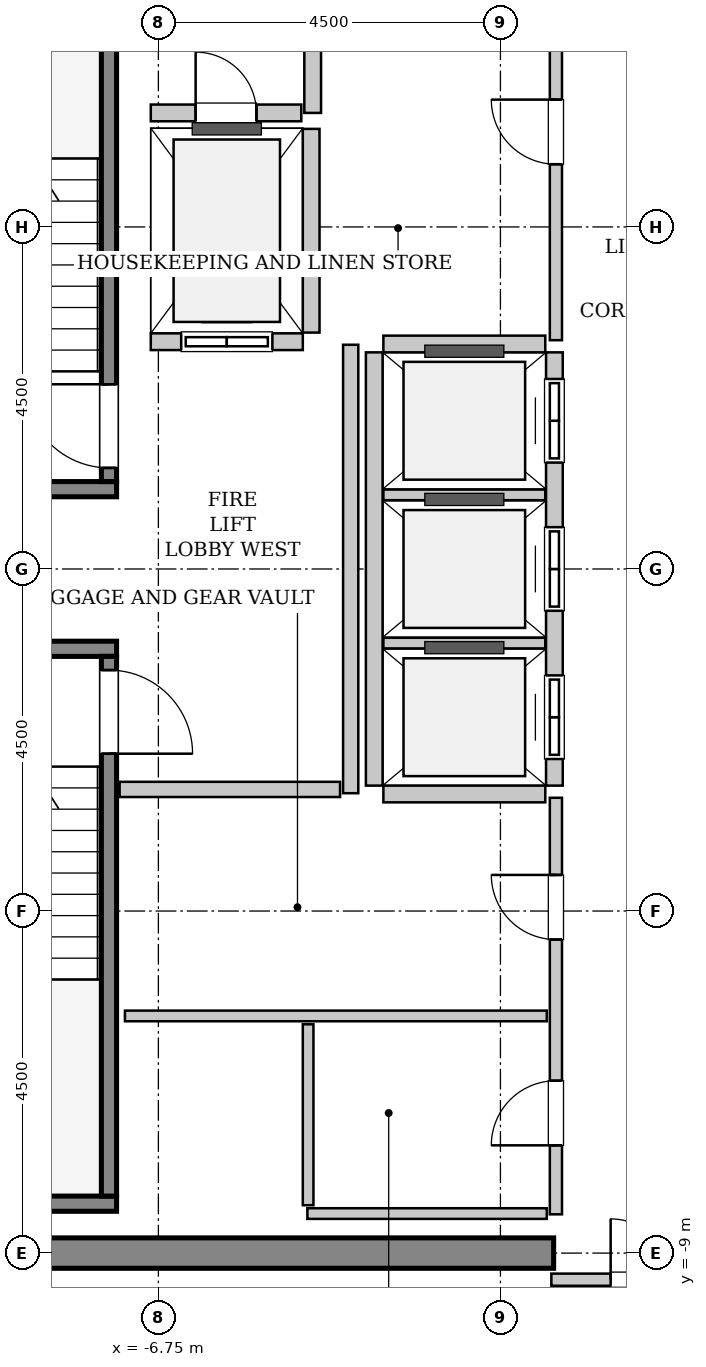
"""IFC4 building model, lengths in metres.
Left out: names, types, materials, properties, quantities, classifications, styles, units other than length and angle.
Written with IfcOpenShell. Run it as: python <this file> out.ifc"""

import sys

from ifc_helpers import new_model, si_unit, direction, frame, frame_2d, origin, place, context, subcontext, project, spatial, rectangle, extrude, source, transform, mapped, element, fill, save


model = new_model("IFC4")
c1 = context("Model", 3, precision=1e-05, world=origin(), true_north=direction((0.0, 1.0)))
c2 = subcontext(c1, "Body", "Model", "MODEL_VIEW")
j1 = project(units=[si_unit("LENGTHUNIT", "METRE"), si_unit("PLANEANGLEUNIT", "RADIAN")], contexts=[c1])
p1 = place(None, origin())
s1 = spatial("IfcSite", under=j1, at=p1, CompositionType="ELEMENT")
p2 = place(p1, origin())
s2 = spatial("IfcBuilding", under=s1, at=p2, CompositionType="ELEMENT")
p3 = place(p2, frame((0.0, 0.0, 326.2)))
s3 = spatial("IfcBuildingStorey", under=s2, at=p3, CompositionType="ELEMENT", Elevation=326.2)
m1 = source(origin(), c2, "Body", "SweptSolid", [
    extrude(rectangle(XDim=9.9, YDim=0.4, at=frame_2d((4.95, 0.0))), origin(), (0.0, 0.0, 1.0), 3.8),
])
p4 = place(p3, frame((-11.45, -9.0, 0.0), z_axis=(0.0, 0.0, 1.0), x_axis=(1.0, 0.0, 0.0)))
e1 = element("IfcWall", 1, at=p4, inside=s3, PredefinedType="SHEAR", context=c2, shape_type="MappedRepresentation", body=[
    mapped(m1, transform((0.0, 0.0, 0.0), x_axis=(1.0, 0.0, 0.0), y_axis=(0.0, 1.0, 0.0), z_axis=(0.0, 0.0, 1.0), scale=1.0)),
])
m2 = source(origin(), c2, "Body", "SweptSolid", [
    extrude(rectangle(XDim=3.4, YDim=0.2, at=frame_2d((1.7, 0.0))), origin(), (0.0, 0.0, 1.0), 3.8),
])
p5 = place(p3, frame((-7.3, 1.05, 0.0), z_axis=(0.0, 0.0, 1.0), x_axis=(-1.0, 0.0, 0.0)))
e2 = element("IfcWall", 2, at=p5, inside=s3, PredefinedType="SOLIDWALL", context=c2, shape_type="MappedRepresentation", body=[
    mapped(m2, transform((0.0, 0.0, 0.0), x_axis=(1.0, 0.0, 0.0), y_axis=(0.0, 1.0, 0.0), z_axis=(0.0, 0.0, 1.0), scale=1.0)),
])
m3 = source(origin(), c2, "Body", "SweptSolid", [
    extrude(rectangle(XDim=7.1, YDim=0.2, at=frame_2d((3.55, 0.0))), origin(), (0.0, 0.0, 1.0), 3.8),
])
p6 = place(p3, frame((-7.4, 1.15, 0.0), z_axis=(0.0, 0.0, 1.0), x_axis=(0.0, 1.0, 0.0)))
e3 = element("IfcWall", 3, at=p6, inside=s3, PredefinedType="SOLIDWALL", context=c2, shape_type="MappedRepresentation", body=[
    mapped(m3, transform((0.0, 0.0, 0.0), x_axis=(1.0, 0.0, 0.0), y_axis=(0.0, 1.0, 0.0), z_axis=(0.0, 0.0, 1.0), scale=1.0)),
])
p7 = place(p6, frame((0.18, 0.0, 0.0)))
e4 = element("IfcOpeningElement", 4, at=p7, cuts=e3, PredefinedType="OPENING", context=c2, shape_type="SweptSolid", body=[
    extrude(rectangle(XDim=1.1, YDim=2.15, at=frame_2d((0.55, 1.075))), frame((0.0, 0.11, 0.0), z_axis=(0.0, -1.0, 0.0), x_axis=(1.0, 0.0, 0.0)), (0.0, 0.0, 1.0), 0.22),
])
p8 = place(p3, frame((-10.7, -1.05, 0.0), z_axis=(0.0, 0.0, 1.0), x_axis=(1.0, 0.0, 0.0)))
e5 = element("IfcWall", 5, at=p8, inside=s3, PredefinedType="SOLIDWALL", context=c2, shape_type="MappedRepresentation", body=[
    mapped(m2, transform((0.0, 0.0, 0.0), x_axis=(1.0, 0.0, 0.0), y_axis=(0.0, 1.0, 0.0), z_axis=(0.0, 0.0, 1.0), scale=1.0)),
])
m4 = source(origin(), c2, "Body", "SweptSolid", [
    extrude(rectangle(XDim=3.755, YDim=0.2, at=frame_2d((1.877, 0.0))), origin(), (0.0, 0.0, 1.0), 3.8),
])
p9 = place(p3, frame((-11.055, -8.35, 0.0), z_axis=(0.0, 0.0, 1.0), x_axis=(1.0, 0.0, 0.0)))
e6 = element("IfcWall", 6, at=p9, inside=s3, PredefinedType="SOLIDWALL", context=c2, shape_type="MappedRepresentation", body=[
    mapped(m4, transform((0.0, 0.0, 0.0), x_axis=(1.0, 0.0, 0.0), y_axis=(0.0, 1.0, 0.0), z_axis=(0.0, 0.0, 1.0), scale=1.0)),
])
p10 = place(p3, frame((-7.4, -1.15, 0.0), z_axis=(0.0, 0.0, 1.0), x_axis=(0.0, -1.0, 0.0)))
e7 = element("IfcWall", 7, at=p10, inside=s3, PredefinedType="SOLIDWALL", context=c2, shape_type="MappedRepresentation", body=[
    mapped(m3, transform((0.0, 0.0, 0.0), x_axis=(1.0, 0.0, 0.0), y_axis=(0.0, 1.0, 0.0), z_axis=(0.0, 0.0, 1.0), scale=1.0)),
])
p11 = place(p10, frame((0.18, 0.0, 0.0)))
e8 = element("IfcOpeningElement", 8, at=p11, cuts=e7, PredefinedType="OPENING", context=c2, shape_type="SweptSolid", body=[
    extrude(rectangle(XDim=1.1, YDim=2.15, at=frame_2d((0.55, 1.075))), frame((0.0, 0.11, 0.0), z_axis=(0.0, -1.0, 0.0), x_axis=(1.0, 0.0, 0.0)), (0.0, 0.0, 1.0), 0.22),
])
m5 = source(origin(), c2, "Body", "SweptSolid", [
    extrude(rectangle(XDim=2.0, YDim=0.22, at=frame_2d((1.0, 0.0))), origin(), (0.0, 0.0, 1.0), 3.535),
])
p12 = place(p3, frame((-6.85, 2.99, 0.0), z_axis=(0.0, 0.0, 1.0), x_axis=(1.0, 0.0, 0.0)))
e9 = element("IfcWall", 9, at=p12, inside=s3, PredefinedType="SOLIDWALL", context=c2, shape_type="MappedRepresentation", body=[
    mapped(m5, transform((0.0, 0.0, 0.0), x_axis=(1.0, 0.0, 0.0), y_axis=(0.0, 1.0, 0.0), z_axis=(0.0, 0.0, 1.0), scale=1.0)),
])
p13 = place(p12, frame((0.4, 0.0, 0.0)))
e10 = element("IfcOpeningElement", 10, at=p13, cuts=e9, PredefinedType="OPENING", context=c2, shape_type="SweptSolid", body=[
    extrude(rectangle(XDim=1.2, YDim=2.2, at=frame_2d((0.6, 1.1))), frame((0.0, 0.12, 0.0), z_axis=(0.0, -1.0, 0.0), x_axis=(1.0, 0.0, 0.0)), (0.0, 0.0, 1.0), 0.24),
])
m6 = source(origin(), c2, "Body", "SweptSolid", [
    extrude(rectangle(XDim=2.68, YDim=0.22, at=frame_2d((1.34, 0.0))), origin(), (0.0, 0.0, 1.0), 3.535),
])
p14 = place(p3, frame((-4.74, 3.11, 0.0), z_axis=(0.0, 0.0, 1.0), x_axis=(0.0, 1.0, 0.0)))
e11 = element("IfcWall", 11, at=p14, inside=s3, PredefinedType="SOLIDWALL", context=c2, shape_type="MappedRepresentation", body=[
    mapped(m6, transform((0.0, 0.0, 0.0), x_axis=(1.0, 0.0, 0.0), y_axis=(0.0, 1.0, 0.0), z_axis=(0.0, 0.0, 1.0), scale=1.0)),
])
m7 = source(origin(), c2, "Body", "SweptSolid", [
    extrude(rectangle(XDim=5.7, YDim=0.22, at=frame_2d((2.85, 0.0))), origin(), (0.0, 0.0, 1.0), 3.535),
])
p15 = place(p3, frame((-1.54, -2.85, 0.0), z_axis=(0.0, 0.0, 1.0), x_axis=(0.0, 1.0, 0.0)))
e12 = element("IfcWall", 12, at=p15, inside=s3, PredefinedType="SOLIDWALL", context=c2, shape_type="MappedRepresentation", body=[
    mapped(m7, transform((0.0, 0.0, 0.0), x_axis=(1.0, 0.0, 0.0), y_axis=(0.0, 1.0, 0.0), z_axis=(0.0, 0.0, 1.0), scale=1.0)),
])
p16 = place(p15, frame((0.35, 0.0, 0.0)))
e13 = element("IfcOpeningElement", 13, at=p16, cuts=e12, PredefinedType="OPENING", context=c2, shape_type="SweptSolid", body=[
    extrude(rectangle(XDim=1.1, YDim=2.2, at=frame_2d((0.55, 1.1))), frame((0.0, 0.12, 0.0), z_axis=(0.0, -1.0, 0.0), x_axis=(1.0, 0.0, 0.0)), (0.0, 0.0, 1.0), 0.24),
])
p17 = place(p15, frame((2.3, 0.0, 0.0)))
e14 = element("IfcOpeningElement", 14, at=p17, cuts=e12, PredefinedType="OPENING", context=c2, shape_type="SweptSolid", body=[
    extrude(rectangle(XDim=1.1, YDim=2.2, at=frame_2d((0.55, 1.1))), frame((0.0, 0.12, 0.0), z_axis=(0.0, -1.0, 0.0), x_axis=(1.0, 0.0, 0.0)), (0.0, 0.0, 1.0), 0.24),
])
p18 = place(p15, frame((4.25, 0.0, 0.0)))
e15 = element("IfcOpeningElement", 15, at=p18, cuts=e12, PredefinedType="OPENING", context=c2, shape_type="SweptSolid", body=[
    extrude(rectangle(XDim=1.1, YDim=2.2, at=frame_2d((0.55, 1.1))), frame((0.0, 0.12, 0.0), z_axis=(0.0, -1.0, 0.0), x_axis=(1.0, 0.0, 0.0)), (0.0, 0.0, 1.0), 0.24),
])
p19 = place(p3, frame((-3.91, 2.85, 0.0), z_axis=(0.0, 0.0, 1.0), x_axis=(0.0, -1.0, 0.0)))
e16 = element("IfcWall", 16, at=p19, inside=s3, PredefinedType="SOLIDWALL", context=c2, shape_type="MappedRepresentation", body=[
    mapped(m7, transform((0.0, 0.0, 0.0), x_axis=(1.0, 0.0, 0.0), y_axis=(0.0, 1.0, 0.0), z_axis=(0.0, 0.0, 1.0), scale=1.0)),
])
m8 = source(origin(), c2, "Body", "SweptSolid", [
    extrude(rectangle(XDim=2.13, YDim=0.22, at=frame_2d((1.065, 0.0))), origin(), (0.0, 0.0, 1.0), 3.535),
])
p20 = place(p3, frame((-3.79, -2.96, 0.0), z_axis=(0.0, 0.0, 1.0), x_axis=(1.0, 0.0, 0.0)))
e17 = element("IfcWall", 17, at=p20, inside=s3, PredefinedType="SOLIDWALL", context=c2, shape_type="MappedRepresentation", body=[
    mapped(m8, transform((0.0, 0.0, 0.0), x_axis=(1.0, 0.0, 0.0), y_axis=(0.0, 1.0, 0.0), z_axis=(0.0, 0.0, 1.0), scale=1.0)),
])
m9 = source(origin(), c2, "Body", "SweptSolid", [
    extrude(rectangle(XDim=2.13, YDim=0.14, at=frame_2d((1.065, 0.0))), origin(), (0.0, 0.0, 1.0), 3.535),
])
for number, where, z_axis, x_axis in (
    (18, (-3.79, -0.975, 0.0), (0.0, 0.0, 1.0), (1.0, 0.0, 0.0)),
    (19, (-3.79, 0.975, 0.0), (0.0, 0.0, 1.0), (1.0, 0.0, 0.0)),
):
    element("IfcWall", number, at=place(p3, frame(where, z_axis=z_axis, x_axis=x_axis)), inside=s3, PredefinedType="PARTITIONING", context=c2, shape_type="MappedRepresentation", body=[
        mapped(m9, transform((0.0, 0.0, 0.0), x_axis=(1.0, 0.0, 0.0), y_axis=(0.0, 1.0, 0.0), z_axis=(0.0, 0.0, 1.0), scale=1.0)),
    ])
p21 = place(p3, frame((-1.66, 2.96, 0.0), z_axis=(0.0, 0.0, 1.0), x_axis=(-1.0, 0.0, 0.0)))
e20 = element("IfcWall", 20, at=p21, inside=s3, PredefinedType="SOLIDWALL", context=c2, shape_type="MappedRepresentation", body=[
    mapped(m8, transform((0.0, 0.0, 0.0), x_axis=(1.0, 0.0, 0.0), y_axis=(0.0, 1.0, 0.0), z_axis=(0.0, 0.0, 1.0), scale=1.0)),
])
m10 = source(origin(), c2, "Body", "SweptSolid", [
    extrude(rectangle(XDim=2.25, YDim=0.22, at=frame_2d((1.125, 0.0))), origin(), (0.0, 0.0, 1.0), 3.535),
])
p22 = place(p3, frame((-4.72, 6.0, 0.0), z_axis=(0.0, 0.0, 1.0), x_axis=(0.0, 1.0, 0.0)))
e21 = element("IfcWall", 21, at=p22, inside=s3, PredefinedType="SOLIDWALL", context=c2, shape_type="MappedRepresentation", body=[
    mapped(m10, transform((0.0, 0.0, 0.0), x_axis=(1.0, 0.0, 0.0), y_axis=(0.0, 1.0, 0.0), z_axis=(0.0, 0.0, 1.0), scale=1.0)),
])
m11 = source(origin(), c2, "Body", "SweptSolid", [
    extrude(rectangle(XDim=1.98, YDim=0.22, at=frame_2d((0.99, 0.0))), origin(), (0.0, 0.0, 1.0), 3.535),
])
p23 = place(p3, frame((-6.85, 6.0, 0.0), z_axis=(0.0, 0.0, 1.0), x_axis=(1.0, 0.0, 0.0)))
e22 = element("IfcWall", 22, at=p23, inside=s3, PredefinedType="SOLIDWALL", context=c2, shape_type="MappedRepresentation", body=[
    mapped(m11, transform((0.0, 0.0, 0.0), x_axis=(1.0, 0.0, 0.0), y_axis=(0.0, 1.0, 0.0), z_axis=(0.0, 0.0, 1.0), scale=1.0)),
])
p24 = place(p23, frame((0.59, 0.0, 0.0)))
e23 = element("IfcOpeningElement", 23, at=p24, cuts=e22, PredefinedType="OPENING", context=c2, shape_type="SweptSolid", body=[
    extrude(rectangle(XDim=0.8, YDim=2.0, at=frame_2d((0.4, 1.0))), frame((0.0, 0.12, 0.0), z_axis=(0.0, -1.0, 0.0), x_axis=(1.0, 0.0, 0.0)), (0.0, 0.0, 1.0), 0.24),
])
m12 = source(origin(), c2, "Body", "SweptSolid", [
    extrude(rectangle(XDim=5.9, YDim=0.2, at=frame_2d((2.95, 0.0))), origin(), (0.0, 0.0, 1.0), 3.535),
])
p25 = place(p3, frame((-4.22, -2.95, 0.0), z_axis=(0.0, 0.0, 1.0), x_axis=(0.0, 1.0, 0.0)))
e24 = element("IfcWall", 24, at=p25, inside=s3, PredefinedType="PARTITIONING", context=c2, shape_type="MappedRepresentation", body=[
    mapped(m12, transform((0.0, 0.0, 0.0), x_axis=(1.0, 0.0, 0.0), y_axis=(0.0, 1.0, 0.0), z_axis=(0.0, 0.0, 1.0), scale=1.0)),
])
m13 = source(origin(), c2, "Body", "SweptSolid", [
    extrude(rectangle(XDim=2.9, YDim=0.2, at=frame_2d((1.45, 0.0))), origin(), (0.0, 0.0, 1.0), 3.535),
])
p26 = place(p3, frame((-7.26, -2.9, 0.0), z_axis=(0.0, 0.0, 1.0), x_axis=(1.0, 0.0, 0.0)))
e25 = element("IfcWall", 25, at=p26, inside=s3, PredefinedType="PARTITIONING", context=c2, shape_type="MappedRepresentation", body=[
    mapped(m13, transform((0.0, 0.0, 0.0), x_axis=(1.0, 0.0, 0.0), y_axis=(0.0, 1.0, 0.0), z_axis=(0.0, 0.0, 1.0), scale=1.0)),
])
m14 = source(origin(), c2, "Body", "SweptSolid", [
    extrude(rectangle(XDim=3.16, YDim=0.16, at=frame_2d((1.58, 0.0))), origin(), (0.0, 0.0, 1.0), 2.625),
])
p27 = place(p3, frame((-1.58, -9.35, 0.0), z_axis=(0.0, 0.0, 1.0), x_axis=(1.0, 0.0, 0.0)))
e26 = element("IfcWall", 26, at=p27, inside=s3, PredefinedType="PARTITIONING", context=c2, shape_type="MappedRepresentation", body=[
    mapped(m14, transform((0.0, 0.0, 0.0), x_axis=(1.0, 0.0, 0.0), y_axis=(0.0, 1.0, 0.0), z_axis=(0.0, 0.0, 1.0), scale=1.0)),
])
p28 = place(p27, frame((0.78, 0.0, 0.0)))
e27 = element("IfcOpeningElement", 27, at=p28, cuts=e26, PredefinedType="OPENING", context=c2, shape_type="SweptSolid", body=[
    extrude(rectangle(XDim=1.6, YDim=2.3, at=frame_2d((0.8, 1.15))), frame((0.0, 0.09, 0.0), z_axis=(0.0, -1.0, 0.0), x_axis=(1.0, 0.0, 0.0)), (0.0, 0.0, 1.0), 0.18),
])
m15 = source(origin(), c2, "Body", "SweptSolid", [
    extrude(rectangle(XDim=5.48, YDim=0.16, at=frame_2d((2.74, 0.0))), origin(), (0.0, 0.0, 1.0), 3.535),
])
p29 = place(p3, frame((-1.52, 3.01, 0.0), z_axis=(0.0, 0.0, 1.0), x_axis=(0.0, 1.0, 0.0)))
e28 = element("IfcWall", 28, at=p29, inside=s3, PredefinedType="PARTITIONING", context=c2, shape_type="MappedRepresentation", body=[
    mapped(m15, transform((0.0, 0.0, 0.0), x_axis=(1.0, 0.0, 0.0), y_axis=(0.0, 1.0, 0.0), z_axis=(0.0, 0.0, 1.0), scale=1.0)),
])
p30 = place(p29, frame((2.315, 0.0, 0.0)))
e29 = element("IfcOpeningElement", 29, at=p30, cuts=e28, PredefinedType="OPENING", context=c2, shape_type="SweptSolid", body=[
    extrude(rectangle(XDim=0.85, YDim=2.1, at=frame_2d((0.425, 1.05))), frame((0.0, 0.09, 0.0), z_axis=(0.0, -1.0, 0.0), x_axis=(1.0, 0.0, 0.0)), (0.0, 0.0, 1.0), 0.18),
])
p31 = place(p3, frame((-1.52, -8.49, 0.0), z_axis=(0.0, 0.0, 1.0), x_axis=(0.0, 1.0, 0.0)))
e30 = element("IfcWall", 30, at=p31, inside=s3, PredefinedType="PARTITIONING", context=c2, shape_type="MappedRepresentation", body=[
    mapped(m15, transform((0.0, 0.0, 0.0), x_axis=(1.0, 0.0, 0.0), y_axis=(0.0, 1.0, 0.0), z_axis=(0.0, 0.0, 1.0), scale=1.0)),
])
p32 = place(p31, frame((0.907, 0.0, 0.0)))
e31 = element("IfcOpeningElement", 31, at=p32, cuts=e30, PredefinedType="OPENING", context=c2, shape_type="SweptSolid", body=[
    extrude(rectangle(XDim=0.85, YDim=2.1, at=frame_2d((0.425, 1.05))), frame((0.0, 0.09, 0.0), z_axis=(0.0, -1.0, 0.0), x_axis=(1.0, 0.0, 0.0)), (0.0, 0.0, 1.0), 0.18),
])
p33 = place(p31, frame((3.615, 0.0, 0.0)))
e32 = element("IfcOpeningElement", 32, at=p33, cuts=e30, PredefinedType="OPENING", context=c2, shape_type="SweptSolid", body=[
    extrude(rectangle(XDim=0.85, YDim=2.1, at=frame_2d((0.425, 1.05))), frame((0.0, 0.09, 0.0), z_axis=(0.0, -1.0, 0.0), x_axis=(1.0, 0.0, 0.0)), (0.0, 0.0, 1.0), 0.18),
])
m16 = source(origin(), c2, "Body", "SweptSolid", [
    extrude(rectangle(XDim=5.55, YDim=0.14, at=frame_2d((2.775, 0.0))), origin(), (0.0, 0.0, 1.0), 3.535),
])
p34 = place(p3, frame((-7.19, -5.88, 0.0), z_axis=(0.0, 0.0, 1.0), x_axis=(1.0, 0.0, 0.0)))
e33 = element("IfcWall", 33, at=p34, inside=s3, PredefinedType="PARTITIONING", context=c2, shape_type="MappedRepresentation", body=[
    mapped(m16, transform((0.0, 0.0, 0.0), x_axis=(1.0, 0.0, 0.0), y_axis=(0.0, 1.0, 0.0), z_axis=(0.0, 0.0, 1.0), scale=1.0)),
])
m17 = source(origin(), c2, "Body", "SweptSolid", [
    extrude(rectangle(XDim=3.15, YDim=0.14, at=frame_2d((1.575, 0.0))), origin(), (0.0, 0.0, 1.0), 3.535),
])
p35 = place(p3, frame((-4.79, -8.48, 0.0), z_axis=(0.0, 0.0, 1.0), x_axis=(1.0, 0.0, 0.0)))
e34 = element("IfcWall", 34, at=p35, inside=s3, PredefinedType="PARTITIONING", context=c2, shape_type="MappedRepresentation", body=[
    mapped(m17, transform((0.0, 0.0, 0.0), x_axis=(1.0, 0.0, 0.0), y_axis=(0.0, 1.0, 0.0), z_axis=(0.0, 0.0, 1.0), scale=1.0)),
])
m18 = source(origin(), c2, "Body", "SweptSolid", [
    extrude(rectangle(XDim=2.38, YDim=0.14, at=frame_2d((1.19, 0.0))), origin(), (0.0, 0.0, 1.0), 3.535),
])
p36 = place(p3, frame((-4.78, -8.37, 0.0), z_axis=(0.0, 0.0, 1.0), x_axis=(0.0, 1.0, 0.0)))
e35 = element("IfcWall", 35, at=p36, inside=s3, PredefinedType="PARTITIONING", context=c2, shape_type="MappedRepresentation", body=[
    mapped(m18, transform((0.0, 0.0, 0.0), x_axis=(1.0, 0.0, 0.0), y_axis=(0.0, 1.0, 0.0), z_axis=(0.0, 0.0, 1.0), scale=1.0)),
])
m19 = source(origin(), c2, "Body", "SweptSolid", [
    extrude(rectangle(XDim=1.1, YDim=2.15, at=frame_2d((0.55, 1.075))), frame((0.0, 0.025, 0.0), z_axis=(0.0, -1.0, 0.0), x_axis=(1.0, 0.0, 0.0)), (0.0, 0.0, 1.0), 0.05),
])
p37 = place(p7, origin())
e36 = element("IfcDoor", 36, at=p37, inside=s3, OperationType="SINGLE_SWING_RIGHT", PredefinedType="DOOR", context=c2, shape_type="MappedRepresentation", body=[
    mapped(m19, transform((0.0, 0.0, 0.0), x_axis=(1.0, 0.0, 0.0), y_axis=(0.0, 1.0, 0.0), z_axis=(0.0, 0.0, 1.0), scale=1.0)),
])
fill(e4, e36)
p38 = place(p11, origin())
e37 = element("IfcDoor", 37, at=p38, inside=s3, OperationType="SINGLE_SWING_RIGHT", PredefinedType="DOOR", context=c2, shape_type="MappedRepresentation", body=[
    mapped(m19, transform((0.0, 0.0, 0.0), x_axis=(1.0, 0.0, 0.0), y_axis=(0.0, 1.0, 0.0), z_axis=(0.0, 0.0, 1.0), scale=1.0)),
])
fill(e8, e37)
m20 = source(origin(), c2, "Body", "SweptSolid", [
    extrude(rectangle(XDim=1.2, YDim=2.2, at=frame_2d((0.6, 1.1))), frame((0.0, 0.025, 0.0), z_axis=(0.0, -1.0, 0.0), x_axis=(1.0, 0.0, 0.0)), (0.0, 0.0, 1.0), 0.05),
])
p39 = place(p13, origin())
e38 = element("IfcDoor", 38, at=p39, inside=s3, OperationType="SLIDING_TO_LEFT", PredefinedType="DOOR", context=c2, shape_type="MappedRepresentation", body=[
    mapped(m20, transform((0.0, 0.0, 0.0), x_axis=(1.0, 0.0, 0.0), y_axis=(0.0, 1.0, 0.0), z_axis=(0.0, 0.0, 1.0), scale=1.0)),
])
fill(e10, e38)
m21 = source(origin(), c2, "Body", "SweptSolid", [
    extrude(rectangle(XDim=1.1, YDim=2.2, at=frame_2d((0.55, 1.1))), frame((0.0, 0.025, 0.0), z_axis=(0.0, -1.0, 0.0), x_axis=(1.0, 0.0, 0.0)), (0.0, 0.0, 1.0), 0.05),
])
p40 = place(p16, origin())
e39 = element("IfcDoor", 39, at=p40, inside=s3, OperationType="DOUBLE_DOOR_SLIDING", PredefinedType="DOOR", context=c2, shape_type="MappedRepresentation", body=[
    mapped(m21, transform((0.0, 0.0, 0.0), x_axis=(1.0, 0.0, 0.0), y_axis=(0.0, 1.0, 0.0), z_axis=(0.0, 0.0, 1.0), scale=1.0)),
])
fill(e13, e39)
p41 = place(p17, origin())
e40 = element("IfcDoor", 40, at=p41, inside=s3, OperationType="DOUBLE_DOOR_SLIDING", PredefinedType="DOOR", context=c2, shape_type="MappedRepresentation", body=[
    mapped(m21, transform((0.0, 0.0, 0.0), x_axis=(1.0, 0.0, 0.0), y_axis=(0.0, 1.0, 0.0), z_axis=(0.0, 0.0, 1.0), scale=1.0)),
])
fill(e14, e40)
p42 = place(p18, origin())
e41 = element("IfcDoor", 41, at=p42, inside=s3, OperationType="DOUBLE_DOOR_SLIDING", PredefinedType="DOOR", context=c2, shape_type="MappedRepresentation", body=[
    mapped(m21, transform((0.0, 0.0, 0.0), x_axis=(1.0, 0.0, 0.0), y_axis=(0.0, 1.0, 0.0), z_axis=(0.0, 0.0, 1.0), scale=1.0)),
])
fill(e15, e41)
m22 = source(origin(), c2, "Body", "SweptSolid", [
    extrude(rectangle(XDim=0.8, YDim=2.0, at=frame_2d((0.4, 1.0))), frame((0.0, 0.025, 0.0), z_axis=(0.0, -1.0, 0.0), x_axis=(1.0, 0.0, 0.0)), (0.0, 0.0, 1.0), 0.05),
])
p43 = place(p24, origin())
e42 = element("IfcDoor", 42, at=p43, inside=s3, OperationType="SINGLE_SWING_LEFT", PredefinedType="TRAPDOOR", context=c2, shape_type="MappedRepresentation", body=[
    mapped(m22, transform((0.0, 0.0, 0.0), x_axis=(1.0, 0.0, 0.0), y_axis=(0.0, 1.0, 0.0), z_axis=(0.0, 0.0, 1.0), scale=1.0)),
])
fill(e23, e42)
m23 = source(origin(), c2, "Body", "SweptSolid", [
    extrude(rectangle(XDim=1.6, YDim=2.3, at=frame_2d((0.8, 1.15))), frame((0.0, 0.025, 0.0), z_axis=(0.0, -1.0, 0.0), x_axis=(1.0, 0.0, 0.0)), (0.0, 0.0, 1.0), 0.05),
])
p44 = place(p28, origin())
e43 = element("IfcDoor", 43, at=p44, inside=s3, OperationType="DOUBLE_DOOR_SINGLE_SWING", PredefinedType="DOOR", context=c2, shape_type="MappedRepresentation", body=[
    mapped(m23, transform((0.0, 0.0, 0.0), x_axis=(1.0, 0.0, 0.0), y_axis=(0.0, 1.0, 0.0), z_axis=(0.0, 0.0, 1.0), scale=1.0)),
])
fill(e27, e43)
m24 = source(origin(), c2, "Body", "SweptSolid", [
    extrude(rectangle(XDim=0.85, YDim=2.1, at=frame_2d((0.425, 1.05))), frame((0.0, 0.025, 0.0), z_axis=(0.0, -1.0, 0.0), x_axis=(1.0, 0.0, 0.0)), (0.0, 0.0, 1.0), 0.05),
])
p45 = place(p30, origin())
e44 = element("IfcDoor", 44, at=p45, inside=s3, OperationType="SINGLE_SWING_RIGHT", PredefinedType="DOOR", context=c2, shape_type="MappedRepresentation", body=[
    mapped(m24, transform((0.0, 0.0, 0.0), x_axis=(1.0, 0.0, 0.0), y_axis=(0.0, 1.0, 0.0), z_axis=(0.0, 0.0, 1.0), scale=1.0)),
])
fill(e29, e44)
p46 = place(p32, origin())
e45 = element("IfcDoor", 45, at=p46, inside=s3, OperationType="SINGLE_SWING_LEFT", PredefinedType="DOOR", context=c2, shape_type="MappedRepresentation", body=[
    mapped(m24, transform((0.0, 0.0, 0.0), x_axis=(1.0, 0.0, 0.0), y_axis=(0.0, 1.0, 0.0), z_axis=(0.0, 0.0, 1.0), scale=1.0)),
])
fill(e31, e45)
p47 = place(p33, origin())
e46 = element("IfcDoor", 46, at=p47, inside=s3, OperationType="SINGLE_SWING_RIGHT", PredefinedType="DOOR", context=c2, shape_type="MappedRepresentation", body=[
    mapped(m24, transform((0.0, 0.0, 0.0), x_axis=(1.0, 0.0, 0.0), y_axis=(0.0, 1.0, 0.0), z_axis=(0.0, 0.0, 1.0), scale=1.0)),
])
fill(e32, e46)
save(model, sys.argv[1])
